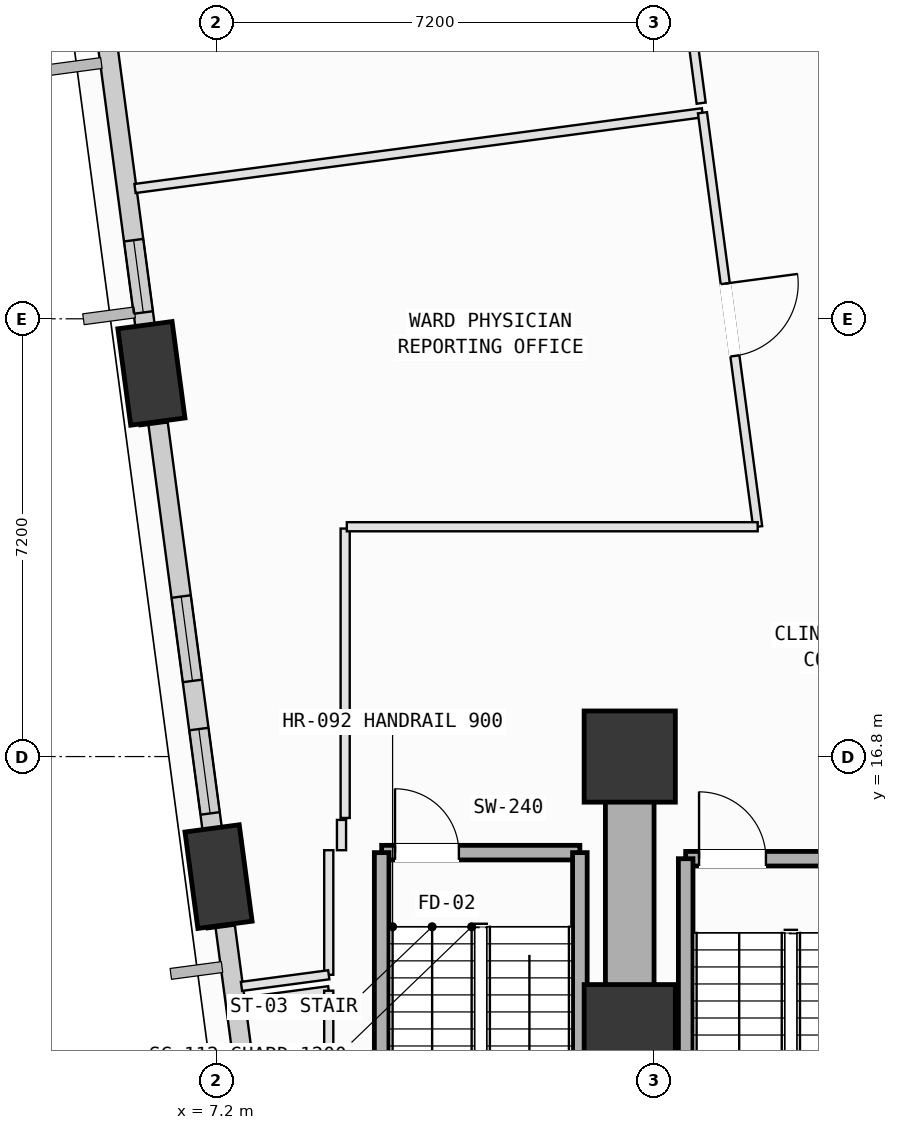
"""IFC4 building model, lengths in metres.
Left out: names, types, materials, properties, quantities, classifications, styles, units other than length and angle.
Written with IfcOpenShell. Run it as: python <this file> out.ifc"""

import sys

from ifc_helpers import new_model, si_unit, direction, frame, frame_2d, origin, origin_2d, place, context, subcontext, project, spatial, rectangle, extrude, element, fill, save


model = new_model("IFC4")
c1 = context("Model", 3, precision=1e-05, world=origin(), true_north=direction((0.0, 1.0)))
c2 = subcontext(c1, "Body", "Model", "MODEL_VIEW")
j1 = project(units=[si_unit("LENGTHUNIT", "METRE"), si_unit("PLANEANGLEUNIT", "RADIAN")], contexts=[c1])
p1 = place(None, origin())
s1 = spatial("IfcSite", under=j1, at=p1, CompositionType="ELEMENT")
p2 = place(p1, origin())
s2 = spatial("IfcBuilding", under=s1, at=p2, CompositionType="ELEMENT")
p3 = place(p2, frame((0.0, 0.0, 55.0)))
s3 = spatial("IfcBuildingStorey", under=s2, at=p3, CompositionType="ELEMENT", Elevation=55.0)
for number, where, z_axis, x_axis in (
    (1, (14.0, 12.3, 0.0), (0.0, 0.0, 1.0), (1.0, 0.0, 0.0)),
    (2, (14.0, 16.8, 0.0), (0.0, 0.0, 1.0), (1.0, 0.0, 0.0)),
):
    element("IfcColumn", number, at=place(p3, frame(where, z_axis=z_axis, x_axis=x_axis)), inside=s3, PredefinedType="COLUMN", context=c2, shape_type="SweptSolid", body=[
        extrude(rectangle(XDim=1.5, YDim=1.5, at=origin_2d()), origin(), (0.0, 0.0, 1.0), 4.0),
    ])
p4 = place(p3, frame((6.133, 23.102, 0.002), z_axis=(0.007890177532, -0.1130723134, 0.993555432294), x_axis=(-0.200490060947, 0.973232171477, 0.112351572595)))
e3 = element("IfcColumn", 3, at=p4, inside=s3, PredefinedType="COLUMN", context=c2, shape_type="SweptSolid", body=[
    extrude(rectangle(XDim=1.6, YDim=0.9, at=origin_2d()), origin(), (0.0, 0.0, 1.0), 4.022),
])
p5 = place(p3, frame((7.238, 14.826, 0.002), z_axis=(0.041986855269, -0.10818289443, 0.993243960635), x_axis=(-0.479510058518, 0.869965068646, 0.115025575925)))
e4 = element("IfcColumn", 4, at=p5, inside=s3, PredefinedType="COLUMN", context=c2, shape_type="SweptSolid", body=[
    extrude(rectangle(XDim=1.6, YDim=0.9, at=origin_2d()), origin(), (0.0, 0.0, 1.0), 4.024),
])
p6 = place(p3, frame((6.083, 23.479, 0.0), z_axis=(0.0, 0.0, 1.0), x_axis=(-0.132257820525, 0.991215349412, 0.0)))
e5 = element("IfcWall", 5, at=p6, inside=s3, PredefinedType="SOLIDWALL", context=c2, shape_type="SweptSolid", body=[
    extrude(rectangle(XDim=5.438, YDim=0.32, at=frame_2d((2.719, 0.0))), origin(), (0.0, 0.0, 1.0), 3.165),
])
p7 = place(p6, frame((0.63, 0.0, 0.75)))
e6 = element("IfcOpeningElement", 6, at=p7, cuts=e5, PredefinedType="OPENING", context=c2, shape_type="SweptSolid", body=[
    extrude(rectangle(XDim=1.2, YDim=1.75, at=frame_2d((0.6, 0.875))), frame((0.0, 0.17, 0.0), z_axis=(0.0, -1.0, 0.0), x_axis=(1.0, 0.0, 0.0)), (0.0, 0.0, 1.0), 0.34),
])
p8 = place(p3, frame((7.188, 15.201, 0.0), z_axis=(0.0, 0.0, 1.0), x_axis=(-0.132257835748, 0.991215347381, 0.0)))
e7 = element("IfcWall", 7, at=p8, inside=s3, PredefinedType="SOLIDWALL", context=c2, shape_type="SweptSolid", body=[
    extrude(rectangle(XDim=7.136, YDim=0.32, at=frame_2d((3.568, 0.0))), origin(), (0.0, 0.0, 1.0), 3.165),
])
p9 = place(p8, frame((2.869, 0.0, 0.75)))
e8 = element("IfcOpeningElement", 8, at=p9, cuts=e7, PredefinedType="OPENING", context=c2, shape_type="SweptSolid", body=[
    extrude(rectangle(XDim=1.4, YDim=1.85, at=frame_2d((0.7, 0.925))), frame((0.0, 0.17, 0.0), z_axis=(0.0, -1.0, 0.0), x_axis=(1.0, 0.0, 0.0)), (0.0, 0.0, 1.0), 0.34),
])
p10 = place(p8, frame((0.67, 0.0, 0.75)))
e9 = element("IfcOpeningElement", 9, at=p10, cuts=e7, PredefinedType="OPENING", context=c2, shape_type="SweptSolid", body=[
    extrude(rectangle(XDim=1.4, YDim=1.85, at=frame_2d((0.7, 0.925))), frame((0.0, 0.17, 0.0), z_axis=(0.0, -1.0, 0.0), x_axis=(1.0, 0.0, 0.0)), (0.0, 0.0, 1.0), 0.34),
])
p11 = place(p3, frame((8.141, 8.056, 0.0), z_axis=(0.0, 0.0, 1.0), x_axis=(-0.132267717254, 0.991214028842, 0.0)))
e10 = element("IfcWall", 10, at=p11, inside=s3, PredefinedType="SOLIDWALL", context=c2, shape_type="SweptSolid", body=[
    extrude(rectangle(XDim=5.997, YDim=0.32, at=frame_2d((2.999, 0.0))), origin(), (0.0, 0.0, 1.0), 3.165),
])
p12 = place(p11, frame((1.362, 0.0, 0.75)))
e11 = element("IfcOpeningElement", 11, at=p12, cuts=e10, PredefinedType="OPENING", context=c2, shape_type="SweptSolid", body=[
    extrude(rectangle(XDim=1.8, YDim=2.05, at=frame_2d((0.9, 1.025))), frame((0.0, 0.17, 0.0), z_axis=(0.0, -1.0, 0.0), x_axis=(1.0, 0.0, 0.0)), (0.0, 0.0, 1.0), 0.34),
])
p13 = place(p3, frame((14.92, 15.12, 0.0), z_axis=(0.0, 0.0, 1.0), x_axis=(1.0, 0.0, 0.0)))
e12 = element("IfcWall", 12, at=p13, inside=s3, PredefinedType="SOLIDWALL", context=c2, shape_type="SweptSolid", body=[
    extrude(rectangle(XDim=3.46, YDim=0.24, at=frame_2d((1.73, 0.0))), origin(), (0.0, 0.0, 1.0), 3.78),
])
p14 = place(p13, frame((0.22, 0.0, 0.0)))
e13 = element("IfcOpeningElement", 13, at=p14, cuts=e12, PredefinedType="OPENING", context=c2, shape_type="SweptSolid", body=[
    extrude(rectangle(XDim=1.1, YDim=2.15, at=frame_2d((0.55, 1.075))), frame((0.0, 0.13, 0.0), z_axis=(0.0, -1.0, 0.0), x_axis=(1.0, 0.0, 0.0)), (0.0, 0.0, 1.0), 0.26),
])
p15 = place(p3, frame((14.92, 8.2, 0.0), z_axis=(0.0, 0.0, 1.0), x_axis=(0.0, 1.0, 0.0)))
e14 = element("IfcWall", 14, at=p15, inside=s3, PredefinedType="SOLIDWALL", context=c2, shape_type="SweptSolid", body=[
    extrude(rectangle(XDim=6.92, YDim=0.24, at=frame_2d((3.46, 0.0))), origin(), (0.0, 0.0, 1.0), 3.78),
])
p16 = place(p3, frame((9.92, 15.22, 0.0), z_axis=(0.0, 0.0, 1.0), x_axis=(1.0, 0.0, 0.0)))
e15 = element("IfcWall", 15, at=p16, inside=s3, PredefinedType="SOLIDWALL", context=c2, shape_type="SweptSolid", body=[
    extrude(rectangle(XDim=3.26, YDim=0.24, at=frame_2d((1.63, 0.0))), origin(), (0.0, 0.0, 1.0), 3.78),
])
p17 = place(p16, frame((0.22, 0.0, 0.0)))
e16 = element("IfcOpeningElement", 16, at=p17, cuts=e15, PredefinedType="OPENING", context=c2, shape_type="SweptSolid", body=[
    extrude(rectangle(XDim=1.05, YDim=2.15, at=frame_2d((0.525, 1.075))), frame((0.0, 0.13, 0.0), z_axis=(0.0, -1.0, 0.0), x_axis=(1.0, 0.0, 0.0)), (0.0, 0.0, 1.0), 0.26),
])
for number, where, z_axis, x_axis in (
    (17, (13.18, 15.22, 0.0), (0.0, 0.0, 1.0), (0.0, -1.0, 0.0)),
    (18, (9.92, 8.17, 0.0), (0.0, 0.0, 1.0), (0.0, 1.0, 0.0)),
):
    element("IfcWall", number, at=place(p3, frame(where, z_axis=z_axis, x_axis=x_axis)), inside=s3, PredefinedType="SOLIDWALL", context=c2, shape_type="SweptSolid", body=[
        extrude(rectangle(XDim=7.05, YDim=0.24, at=frame_2d((3.525, 0.0))), origin(), (0.0, 0.0, 1.0), 3.78),
    ])
p18 = place(p3, frame((14.0, 16.8, 0.0), z_axis=(0.0, 0.0, 1.0), x_axis=(0.0, -1.0, 0.0)))
e19 = element("IfcWall", 19, at=p18, inside=s3, PredefinedType="SHEAR", context=c2, shape_type="SweptSolid", body=[
    extrude(rectangle(XDim=9.0, YDim=0.8, at=frame_2d((4.5, 0.0))), origin(), (0.0, 0.0, 1.0), 3.78),
])
p19 = place(p3, frame((7.649, 12.762, 0.0), z_axis=(0.0, 0.0, 1.0), x_axis=(0.99120979028, 0.132299477148, 0.0)))
e20 = element("IfcWall", 20, at=p19, inside=s3, PredefinedType="PARTITIONING", context=c2, shape_type="SweptSolid", body=[
    extrude(rectangle(XDim=1.414, YDim=0.15, at=frame_2d((0.707, 0.0))), origin(), (0.0, 0.0, 1.0), 3.78),
])
p20 = place(p3, frame((9.05, 12.949, 0.0), z_axis=(0.0, 0.0, 1.0), x_axis=(0.0, -1.0, 0.0)))
e21 = element("IfcWall", 21, at=p20, inside=s3, PredefinedType="PARTITIONING", context=c2, shape_type="SweptSolid", body=[
    extrude(rectangle(XDim=5.449, YDim=0.15, at=frame_2d((2.725, 0.0))), origin(), (0.0, 0.0, 1.0), 3.78),
])
p21 = place(p3, frame((9.32, 20.55, 0.0), z_axis=(0.0, 0.0, 1.0), x_axis=(0.0, -1.0, 0.0)))
e22 = element("IfcWall", 22, at=p21, inside=s3, PredefinedType="PARTITIONING", context=c2, shape_type="SweptSolid", body=[
    extrude(rectangle(XDim=4.76, YDim=0.15, at=frame_2d((2.38, 0.0))), origin(), (0.0, 0.0, 1.0), 3.78),
])
p22 = place(p3, frame((9.26, 15.758, 0.0), z_axis=(0.0, 0.0, 1.0), x_axis=(0.0, -1.0, 0.0)))
e23 = element("IfcWall", 23, at=p22, inside=s3, PredefinedType="PARTITIONING", context=c2, shape_type="SweptSolid", body=[
    extrude(rectangle(XDim=0.498, YDim=0.15, at=frame_2d((0.249, 0.0))), origin(), (0.0, 0.0, 1.0), 3.78),
])
p23 = place(p3, frame((9.05, 15.26, 0.0), z_axis=(0.0, 0.0, 1.0), x_axis=(0.0, -1.0, 0.0)))
e24 = element("IfcWall", 24, at=p23, inside=s3, PredefinedType="PARTITIONING", context=c2, shape_type="SweptSolid", body=[
    extrude(rectangle(XDim=2.049, YDim=0.15, at=frame_2d((1.024, 0.0))), origin(), (0.0, 0.0, 1.0), 3.78),
])
p24 = place(p3, frame((9.05, 13.211, 0.0), z_axis=(0.0, 0.0, 1.0), x_axis=(-0.991266152883, -0.131876510982, 0.0)))
e25 = element("IfcWall", 25, at=p24, inside=s3, PredefinedType="PARTITIONING", context=c2, shape_type="SweptSolid", body=[
    extrude(rectangle(XDim=1.448, YDim=0.15, at=frame_2d((0.724, 0.0))), origin(), (0.0, 0.0, 1.0), 3.78),
])
p25 = place(p3, frame((7.12, 13.97, 0.0), z_axis=(0.0, 0.0, 1.0), x_axis=(-0.132295817468, 0.99121027874, 0.0)))
e26 = element("IfcWall", 26, at=p25, inside=s3, PredefinedType="PARTITIONING", context=c2, shape_type="SweptSolid", body=[
    extrude(rectangle(XDim=1.211, YDim=0.15, at=frame_2d((0.605, 0.0))), origin(), (0.0, 0.0, 1.0), 3.165),
])
p26 = place(p3, frame((6.016, 22.244, 0.0), z_axis=(0.0, 0.0, 1.0), x_axis=(-0.132532001564, 0.991178726851, 0.0)))
e27 = element("IfcWall", 27, at=p26, inside=s3, PredefinedType="PARTITIONING", context=c2, shape_type="SweptSolid", body=[
    extrude(rectangle(XDim=1.216, YDim=0.15, at=frame_2d((0.608, 0.0))), origin(), (0.0, 0.0, 1.0), 3.165),
])
p27 = place(p3, frame((5.864, 26.143, 0.0), z_axis=(0.0, 0.0, 1.0), x_axis=(0.991205918813, 0.132328479586, 0.0)))
e28 = element("IfcWall", 28, at=p27, inside=s3, PredefinedType="PARTITIONING", context=c2, shape_type="SweptSolid", body=[
    extrude(rectangle(XDim=9.415, YDim=0.15, at=frame_2d((4.708, 0.0))), origin(), (0.0, 0.0, 1.0), 3.78),
])
p28 = place(p3, frame((15.196, 27.389, 0.0), z_axis=(0.0, 0.0, 1.0), x_axis=(0.132180016539, -0.991225727687, 0.0)))
e29 = element("IfcWall", 29, at=p28, inside=s3, PredefinedType="PARTITIONING", context=c2, shape_type="SweptSolid", body=[
    extrude(rectangle(XDim=6.869, YDim=0.15, at=frame_2d((3.435, 0.0))), origin(), (0.0, 0.0, 1.0), 3.78),
])
p29 = place(p28, frame((2.835, 0.0, 0.0)))
e30 = element("IfcOpeningElement", 30, at=p29, cuts=e29, PredefinedType="OPENING", context=c2, shape_type="SweptSolid", body=[
    extrude(rectangle(XDim=1.2, YDim=2.15, at=frame_2d((0.6, 1.075))), frame((0.0, 0.085, 0.0), z_axis=(0.0, -1.0, 0.0), x_axis=(1.0, 0.0, 0.0)), (0.0, 0.0, 1.0), 0.17),
])
p30 = place(p3, frame((16.104, 20.58, 0.0), z_axis=(0.0, 0.0, 1.0), x_axis=(-1.0, 0.0, 0.0)))
e31 = element("IfcWall", 31, at=p30, inside=s3, PredefinedType="PARTITIONING", context=c2, shape_type="SweptSolid", body=[
    extrude(rectangle(XDim=6.757, YDim=0.15, at=frame_2d((3.378, 0.0))), origin(), (0.0, 0.0, 1.0), 3.78),
])
p31 = place(p3, frame((13.424, 40.671, 0.0), z_axis=(0.0, 0.0, 1.0), x_axis=(0.132248267647, -0.991216624005, 0.0)))
e32 = element("IfcWall", 32, at=p31, inside=s3, PredefinedType="PARTITIONING", context=c2, shape_type="SweptSolid", body=[
    extrude(rectangle(XDim=13.24, YDim=0.15, at=frame_2d((6.62, 0.0))), origin(), (0.0, 0.0, 1.0), 2.865),
])
p32 = place(p31, frame((6.02, 0.0, 0.0)))
e33 = element("IfcOpeningElement", 33, at=p32, cuts=e32, PredefinedType="OPENING", context=c2, shape_type="SweptSolid", body=[
    extrude(rectangle(XDim=1.2, YDim=2.15, at=frame_2d((0.6, 1.075))), frame((0.0, 0.085, 0.0), z_axis=(0.0, -1.0, 0.0), x_axis=(1.0, 0.0, 0.0)), (0.0, 0.0, 1.0), 0.17),
])
p33 = place(p7, origin())
e34 = element("IfcWindow", 34, at=p33, inside=s3, PartitioningType="SINGLE_PANEL", PredefinedType="WINDOW", context=c2, shape_type="SweptSolid", body=[
    extrude(rectangle(XDim=1.2, YDim=1.75, at=frame_2d((0.6, 0.875))), frame((0.0, 0.03, 0.0), z_axis=(0.0, -1.0, 0.0), x_axis=(1.0, 0.0, 0.0)), (0.0, 0.0, 1.0), 0.06),
])
fill(e6, e34)
p34 = place(p9, origin())
e35 = element("IfcWindow", 35, at=p34, inside=s3, PartitioningType="SINGLE_PANEL", PredefinedType="WINDOW", context=c2, shape_type="SweptSolid", body=[
    extrude(rectangle(XDim=1.4, YDim=1.85, at=frame_2d((0.7, 0.925))), frame((0.0, 0.03, 0.0), z_axis=(0.0, -1.0, 0.0), x_axis=(1.0, 0.0, 0.0)), (0.0, 0.0, 1.0), 0.06),
])
fill(e8, e35)
p35 = place(p10, origin())
e36 = element("IfcWindow", 36, at=p35, inside=s3, PartitioningType="SINGLE_PANEL", PredefinedType="WINDOW", context=c2, shape_type="SweptSolid", body=[
    extrude(rectangle(XDim=1.4, YDim=1.85, at=frame_2d((0.7, 0.925))), frame((0.0, 0.03, 0.0), z_axis=(0.0, -1.0, 0.0), x_axis=(1.0, 0.0, 0.0)), (0.0, 0.0, 1.0), 0.06),
])
fill(e9, e36)
p36 = place(p14, origin())
e37 = element("IfcDoor", 37, at=p36, inside=s3, OperationType="SINGLE_SWING_LEFT", PredefinedType="DOOR", context=c2, shape_type="SweptSolid", body=[
    extrude(rectangle(XDim=1.1, YDim=2.15, at=frame_2d((0.55, 1.075))), frame((0.0, 0.025, 0.0), z_axis=(0.0, -1.0, 0.0), x_axis=(1.0, 0.0, 0.0)), (0.0, 0.0, 1.0), 0.05),
])
fill(e13, e37)
p37 = place(p17, origin())
e38 = element("IfcDoor", 38, at=p37, inside=s3, OperationType="SINGLE_SWING_LEFT", PredefinedType="DOOR", context=c2, shape_type="SweptSolid", body=[
    extrude(rectangle(XDim=1.05, YDim=2.15, at=frame_2d((0.525, 1.075))), frame((0.0, 0.025, 0.0), z_axis=(0.0, -1.0, 0.0), x_axis=(1.0, 0.0, 0.0)), (0.0, 0.0, 1.0), 0.05),
])
fill(e16, e38)
p38 = place(p29, origin())
e39 = element("IfcDoor", 39, at=p38, inside=s3, OperationType="SINGLE_SWING_LEFT", PredefinedType="DOOR", context=c2, shape_type="SweptSolid", body=[
    extrude(rectangle(XDim=1.2, YDim=2.15, at=frame_2d((0.6, 1.075))), frame((0.0, 0.025, 0.0), z_axis=(0.0, -1.0, 0.0), x_axis=(1.0, 0.0, 0.0)), (0.0, 0.0, 1.0), 0.05),
])
fill(e30, e39)
save(model, sys.argv[1])
